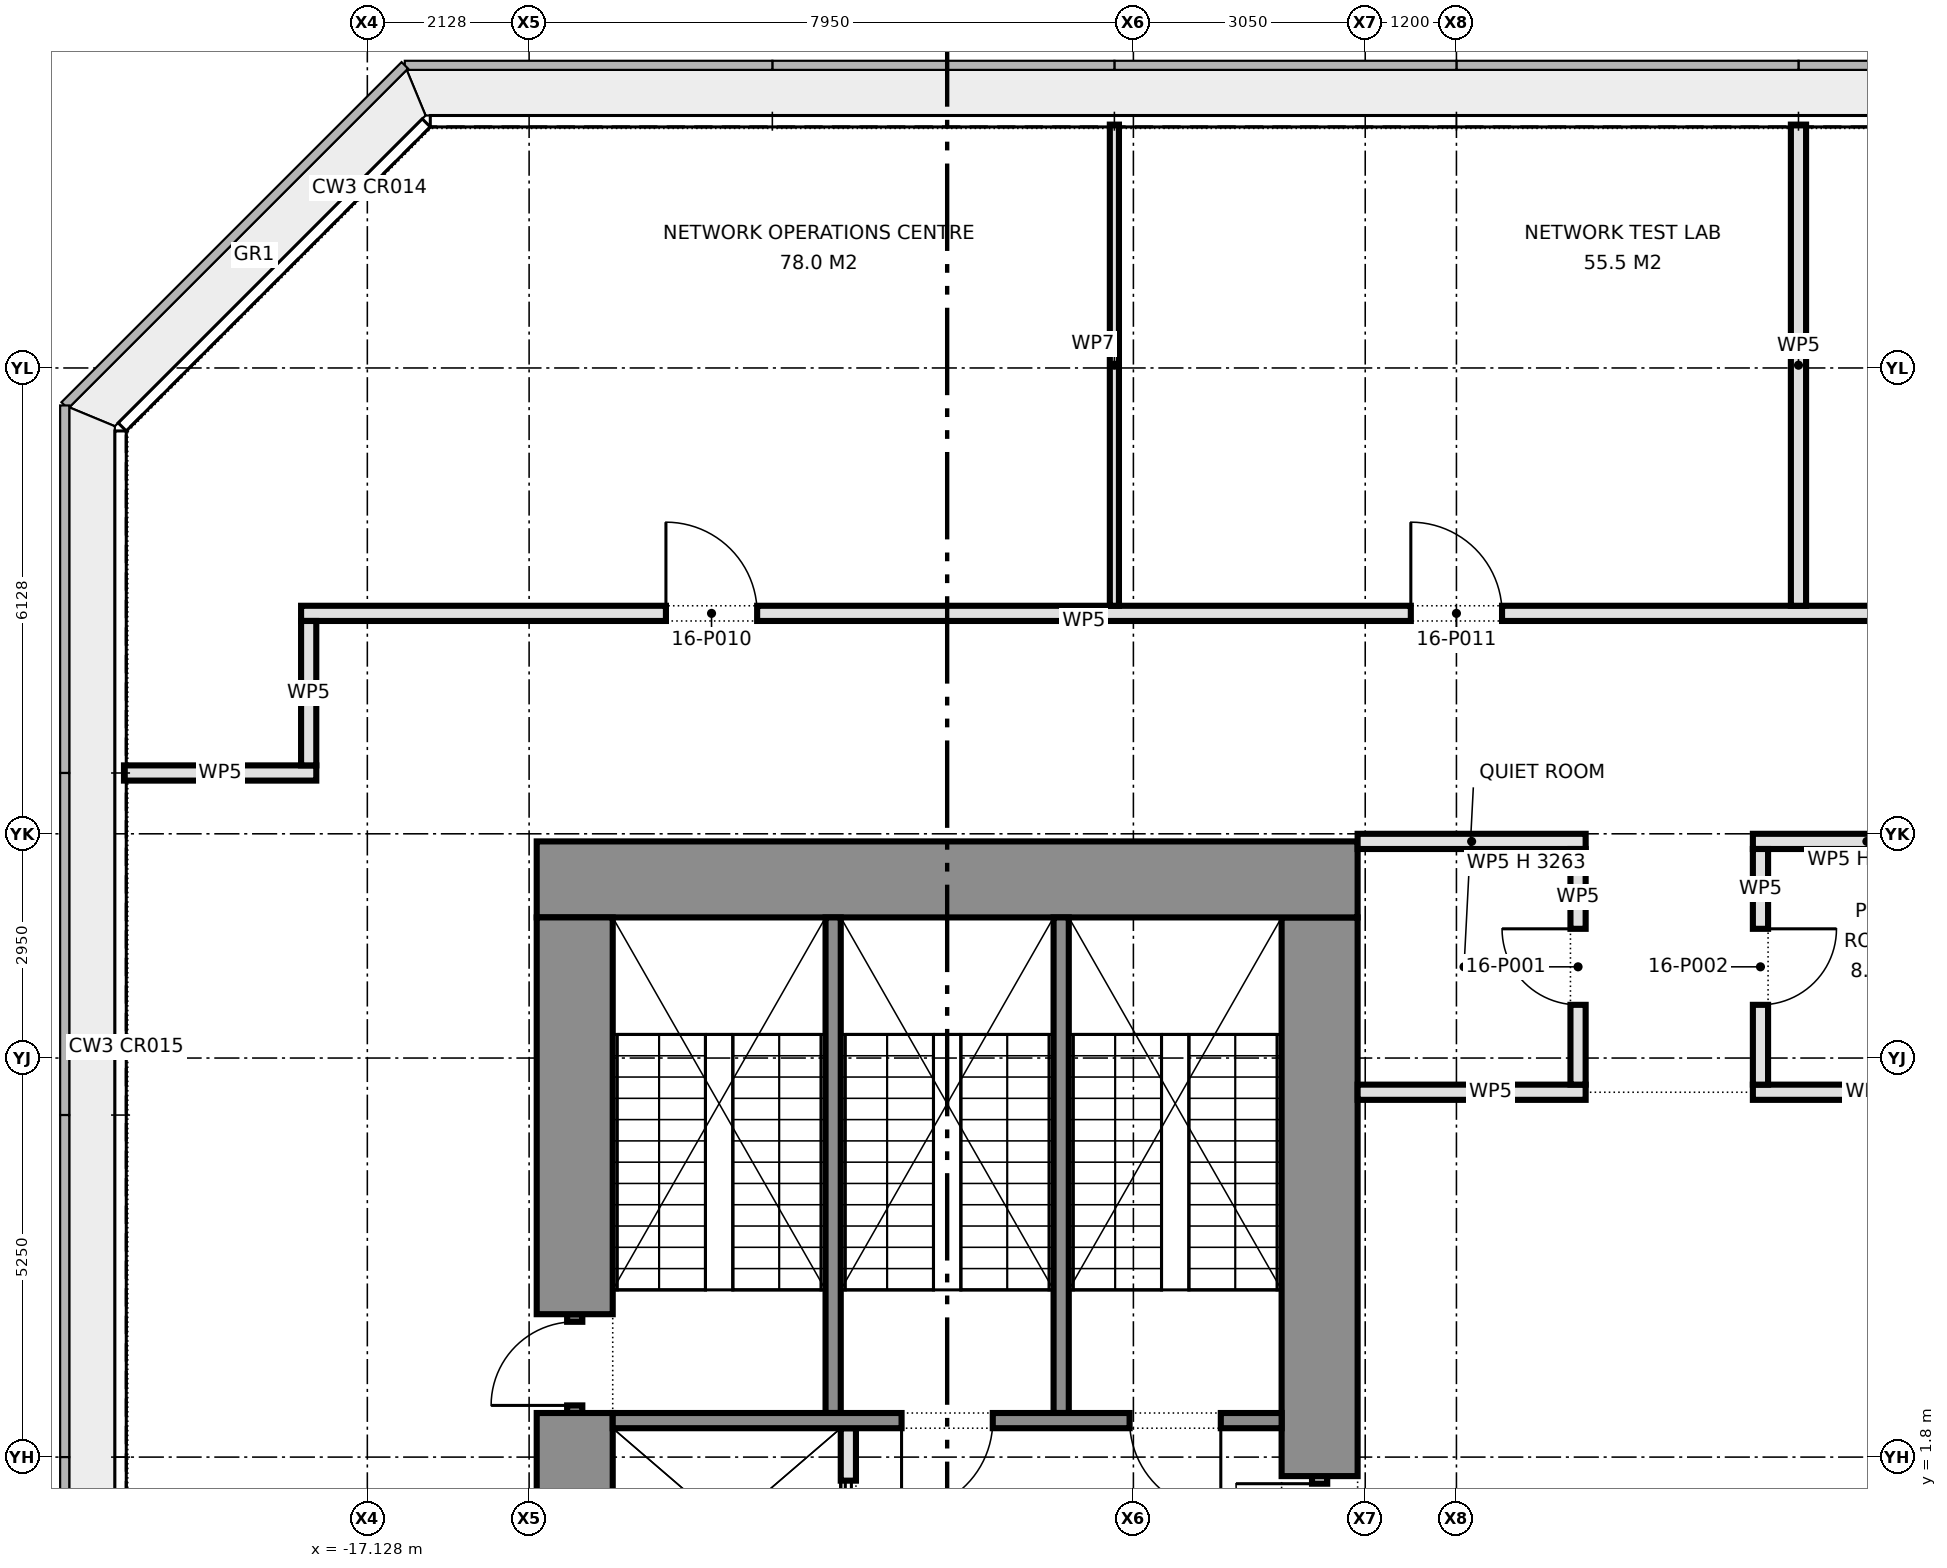
"""IFC4 building model, lengths in metres.
Left out: names, types, materials, properties, quantities, classifications, styles, units other than length and angle.
Written with IfcOpenShell. Run it as: python <this file> out.ifc"""

import sys

from ifc_helpers import new_model, si_unit, direction, frame, frame_2d, origin, place, context, subcontext, project, spatial, rectangle, extrude, element, fill, save


model = new_model("IFC4")
c1 = context("Model", 3, precision=1e-05, world=origin(), true_north=direction((0.0, 1.0)))
c2 = subcontext(c1, "Body", "Model", "MODEL_VIEW")
j1 = project(units=[si_unit("LENGTHUNIT", "METRE"), si_unit("PLANEANGLEUNIT", "RADIAN")], contexts=[c1])
p1 = place(None, origin())
s1 = spatial("IfcSite", under=j1, at=p1, CompositionType="ELEMENT")
p2 = place(p1, origin())
s2 = spatial("IfcBuilding", under=s1, at=p2, CompositionType="ELEMENT")
p3 = place(p2, frame((0.0, 0.0, 73.2)))
s3 = spatial("IfcBuildingStorey", under=s2, at=p3, CompositionType="ELEMENT", Elevation=73.2)
p4 = place(p3, frame((-14.9, 9.4, 0.0), z_axis=(0.0, 0.0, 1.0), x_axis=(1.0, 0.0, 0.0)))
e1 = element("IfcWall", 1, at=p4, inside=s3, PredefinedType="SHEAR", context=c2, shape_type="SweptSolid", body=[
    extrude(rectangle(XDim=10.8, YDim=1.0, at=frame_2d((5.4, 0.0))), origin(), (0.0, 0.0, 1.0), 4.2),
])
p5 = place(p3, frame((-14.4, -3.75, 0.0), z_axis=(0.0, 0.0, 1.0), x_axis=(0.0, 1.0, 0.0)))
e2 = element("IfcWall", 2, at=p5, inside=s3, PredefinedType="SHEAR", context=c2, shape_type="SweptSolid", body=[
    extrude(rectangle(XDim=6.13, YDim=1.0, at=frame_2d((3.065, 0.0))), origin(), (0.0, 0.0, 1.0), 4.2),
])
p6 = place(p3, frame((-14.4, 2.38, 0.0), z_axis=(0.0, 0.0, 1.0), x_axis=(0.0, 1.0, 0.0)))
e3 = element("IfcWall", 3, at=p6, inside=s3, PredefinedType="SHEAR", context=c2, shape_type="SweptSolid", body=[
    extrude(rectangle(XDim=1.3, YDim=0.2, at=frame_2d((0.65, 0.0))), origin(), (0.0, 0.0, 1.0), 2.4),
])
p7 = place(p6, frame((0.1, 0.0, 0.0)))
e4 = element("IfcOpeningElement", 4, at=p7, cuts=e3, PredefinedType="OPENING", context=c2, shape_type="SweptSolid", body=[
    extrude(rectangle(XDim=1.1, YDim=2.1, at=frame_2d((0.55, 1.05))), frame((0.0, 0.11, 0.0), z_axis=(0.0, -1.0, 0.0), x_axis=(1.0, 0.0, 0.0)), (0.0, 0.0, 1.0), 0.22),
])
p8 = place(p3, frame((-14.4, 3.68, 0.0), z_axis=(0.0, 0.0, 1.0), x_axis=(0.0, 1.0, 0.0)))
e5 = element("IfcWall", 5, at=p8, inside=s3, PredefinedType="SHEAR", context=c2, shape_type="SweptSolid", body=[
    extrude(rectangle(XDim=5.22, YDim=1.0, at=frame_2d((2.61, 0.0))), origin(), (0.0, 0.0, 1.0), 4.2),
])
p9 = place(p3, frame((-4.6, 0.25, 0.0), z_axis=(0.0, 0.0, 1.0), x_axis=(0.0, 1.0, 0.0)))
e6 = element("IfcWall", 6, at=p9, inside=s3, PredefinedType="PARTITIONING", context=c2, shape_type="SweptSolid", body=[
    extrude(rectangle(XDim=1.3, YDim=0.2, at=frame_2d((0.65, 0.0))), origin(), (0.0, 0.0, 1.0), 2.4),
])
p10 = place(p9, frame((0.1, 0.0, 0.0)))
e7 = element("IfcOpeningElement", 7, at=p10, cuts=e6, PredefinedType="OPENING", context=c2, shape_type="SweptSolid", body=[
    extrude(rectangle(XDim=1.1, YDim=2.1, at=frame_2d((0.55, 1.05))), frame((0.0, 0.11, 0.0), z_axis=(0.0, -1.0, 0.0), x_axis=(1.0, 0.0, 0.0)), (0.0, 0.0, 1.0), 0.22),
])
p11 = place(p3, frame((-4.6, 1.55, 0.0), z_axis=(0.0, 0.0, 1.0), x_axis=(0.0, 1.0, 0.0)))
e8 = element("IfcWall", 8, at=p11, inside=s3, PredefinedType="SHEAR", context=c2, shape_type="SweptSolid", body=[
    extrude(rectangle(XDim=7.35, YDim=1.0, at=frame_2d((3.675, 0.0))), origin(), (0.0, 0.0, 1.0), 4.2),
])
p12 = place(p3, frame((-10.8, -0.4, 0.0), z_axis=(0.0, 0.0, 1.0), x_axis=(0.0, 1.0, 0.0)))
e9 = element("IfcWall", 9, at=p12, inside=s3, PredefinedType="PARTITIONING", context=c2, shape_type="SweptSolid", body=[
    extrude(rectangle(XDim=2.58, YDim=0.2, at=frame_2d((1.29, 0.0))), origin(), (0.0, 0.0, 1.0), 4.2),
])
p13 = place(p12, frame((0.69, 0.0, 0.0)))
e10 = element("IfcOpeningElement", 10, at=p13, cuts=e9, PredefinedType="OPENING", context=c2, shape_type="SweptSolid", body=[
    extrude(rectangle(XDim=1.2, YDim=2.1, at=frame_2d((0.6, 1.05))), frame((0.0, 0.11, 0.0), z_axis=(0.0, -1.0, 0.0), x_axis=(1.0, 0.0, 0.0)), (0.0, 0.0, 1.0), 0.22),
])
p14 = place(p3, frame((-13.9, 2.28, 0.0), z_axis=(0.0, 0.0, 1.0), x_axis=(1.0, 0.0, 0.0)))
e11 = element("IfcWall", 11, at=p14, inside=s3, PredefinedType="SHEAR", context=c2, shape_type="SweptSolid", body=[
    extrude(rectangle(XDim=8.8, YDim=0.2, at=frame_2d((4.4, 0.0))), origin(), (0.0, 0.0, 1.0), 4.2),
])
p15 = place(p14, frame((3.8, 0.0, 0.0)))
e12 = element("IfcOpeningElement", 12, at=p15, cuts=e11, PredefinedType="OPENING", context=c2, shape_type="SweptSolid", body=[
    extrude(rectangle(XDim=1.2, YDim=2.1, at=frame_2d((0.6, 1.05))), frame((0.0, 0.11, 0.0), z_axis=(0.0, -1.0, 0.0), x_axis=(1.0, 0.0, 0.0)), (0.0, 0.0, 1.0), 0.22),
])
p16 = place(p14, frame((6.8, 0.0, 0.0)))
e13 = element("IfcOpeningElement", 13, at=p16, cuts=e11, PredefinedType="OPENING", context=c2, shape_type="SweptSolid", body=[
    extrude(rectangle(XDim=1.2, YDim=2.1, at=frame_2d((0.6, 1.05))), frame((0.0, 0.11, 0.0), z_axis=(0.0, -1.0, 0.0), x_axis=(1.0, 0.0, 0.0)), (0.0, 0.0, 1.0), 0.22),
])
for number, where, z_axis, x_axis in (
    (14, (-11.0, 2.38, 0.0), (0.0, 0.0, 1.0), (0.0, 1.0, 0.0)),
    (15, (-8.0, 2.38, 0.0), (0.0, 0.0, 1.0), (0.0, 1.0, 0.0)),
):
    element("IfcWall", number, at=place(p3, frame(where, z_axis=z_axis, x_axis=x_axis)), inside=s3, PredefinedType="SHEAR", context=c2, shape_type="SweptSolid", body=[
        extrude(rectangle(XDim=6.52, YDim=0.2, at=frame_2d((3.26, 0.0))), origin(), (0.0, 0.0, 1.0), 4.2),
    ])
for number, where, z_axis, x_axis in (
    (16, (-4.1, 6.6, 0.0), (0.0, 0.0, 1.0), (1.0, 0.0, 0.0)),
    (17, (1.1, 6.6, 0.0), (0.0, 0.0, 1.0), (1.0, 0.0, 0.0)),
):
    element("IfcWall", number, at=place(p3, frame(where, z_axis=z_axis, x_axis=x_axis)), inside=s3, PredefinedType="PARTITIONING", context=c2, shape_type="SweptSolid", body=[
        extrude(rectangle(XDim=3.0, YDim=0.2, at=frame_2d((1.5, 0.0))), origin(), (0.0, 0.0, 1.0), 4.2),
    ])
for number, where, z_axis, x_axis in (
    (18, (-4.1, 9.9, 0.0), (0.0, 0.0, 1.0), (1.0, 0.0, 0.0)),
    (19, (1.1, 9.9, 0.0), (0.0, 0.0, 1.0), (1.0, 0.0, 0.0)),
):
    element("IfcWall", number, at=place(p3, frame(where, z_axis=z_axis, x_axis=x_axis)), inside=s3, PredefinedType="PARTITIONING", context=c2, shape_type="SweptSolid", body=[
        extrude(rectangle(XDim=3.0, YDim=0.2, at=frame_2d((1.5, 0.0))), origin(), (0.0, 0.0, 1.0), 3.263),
    ])
p17 = place(p3, frame((-20.33, 10.8, 0.0), z_axis=(0.0, 0.0, 1.0), x_axis=(1.0, 0.0, 0.0)))
e20 = element("IfcWall", 20, at=p17, inside=s3, PredefinedType="PARTITIONING", context=c2, shape_type="SweptSolid", body=[
    extrude(rectangle(XDim=2.53, YDim=0.2, at=frame_2d((1.265, 0.0))), origin(), (0.0, 0.0, 1.0), 4.2),
])
p18 = place(p3, frame((-18.0, 12.9, 0.0), z_axis=(0.0, 0.0, 1.0), x_axis=(1.0, 0.0, 0.0)))
e21 = element("IfcWall", 21, at=p18, inside=s3, PredefinedType="PARTITIONING", context=c2, shape_type="SweptSolid", body=[
    extrude(rectangle(XDim=36.0, YDim=0.2, at=frame_2d((18.0, 0.0))), origin(), (0.0, 0.0, 1.0), 4.2),
])
p19 = place(p18, frame((4.8, 0.0, 0.0)))
e22 = element("IfcOpeningElement", 22, at=p19, cuts=e21, PredefinedType="OPENING", context=c2, shape_type="SweptSolid", body=[
    extrude(rectangle(XDim=1.2, YDim=2.1, at=frame_2d((0.6, 1.05))), frame((0.0, 0.11, 0.0), z_axis=(0.0, -1.0, 0.0), x_axis=(1.0, 0.0, 0.0)), (0.0, 0.0, 1.0), 0.22),
])
p20 = place(p18, frame((14.6, 0.0, 0.0)))
e23 = element("IfcOpeningElement", 23, at=p20, cuts=e21, PredefinedType="OPENING", context=c2, shape_type="SweptSolid", body=[
    extrude(rectangle(XDim=1.2, YDim=2.1, at=frame_2d((0.6, 1.05))), frame((0.0, 0.11, 0.0), z_axis=(0.0, -1.0, 0.0), x_axis=(1.0, 0.0, 0.0)), (0.0, 0.0, 1.0), 0.22),
])
p21 = place(p18, frame((23.3, 0.0, 0.0)))
e24 = element("IfcOpeningElement", 24, at=p21, cuts=e21, PredefinedType="OPENING", context=c2, shape_type="SweptSolid", body=[
    extrude(rectangle(XDim=1.8, YDim=2.1, at=frame_2d((0.9, 1.05))), frame((0.0, 0.11, 0.0), z_axis=(0.0, -1.0, 0.0), x_axis=(1.0, 0.0, 0.0)), (0.0, 0.0, 1.0), 0.22),
])
p22 = place(p18, frame((32.9, 0.0, 0.0)))
e25 = element("IfcOpeningElement", 25, at=p22, cuts=e21, PredefinedType="OPENING", context=c2, shape_type="SweptSolid", body=[
    extrude(rectangle(XDim=1.8, YDim=2.1, at=frame_2d((0.9, 1.05))), frame((0.0, 0.11, 0.0), z_axis=(0.0, -1.0, 0.0), x_axis=(1.0, 0.0, 0.0)), (0.0, 0.0, 1.0), 0.22),
])
p23 = place(p18, frame((29.7, 0.0, 0.0)))
e26 = element("IfcOpeningElement", 26, at=p23, cuts=e21, PredefinedType="OPENING", context=c2, shape_type="SweptSolid", body=[
    extrude(rectangle(XDim=1.0, YDim=2.1, at=frame_2d((0.5, 1.05))), frame((0.0, 0.11, 0.0), z_axis=(0.0, -1.0, 0.0), x_axis=(1.0, 0.0, 0.0)), (0.0, 0.0, 1.0), 0.22),
])
p24 = place(p3, frame((1.7, 13.0, 0.0), z_axis=(0.0, 0.0, 1.0), x_axis=(0.0, 1.0, 0.0)))
e27 = element("IfcWall", 27, at=p24, inside=s3, PredefinedType="PARTITIONING", context=c2, shape_type="SweptSolid", body=[
    extrude(rectangle(XDim=6.33, YDim=0.2, at=frame_2d((3.165, 0.0))), origin(), (0.0, 0.0, 1.0), 4.2),
])
p25 = place(p3, frame((1.2, 6.7, 0.0), z_axis=(0.0, 0.0, 1.0), x_axis=(0.0, 1.0, 0.0)))
e28 = element("IfcWall", 28, at=p25, inside=s3, PredefinedType="PARTITIONING", context=c2, shape_type="SweptSolid", body=[
    extrude(rectangle(XDim=3.1, YDim=0.2, at=frame_2d((1.55, 0.0))), origin(), (0.0, 0.0, 1.0), 4.2),
])
p26 = place(p25, frame((1.05, 0.0, 0.0)))
e29 = element("IfcOpeningElement", 29, at=p26, cuts=e28, PredefinedType="OPENING", context=c2, shape_type="SweptSolid", body=[
    extrude(rectangle(XDim=1.0, YDim=2.1, at=frame_2d((0.5, 1.05))), frame((0.0, 0.11, 0.0), z_axis=(0.0, -1.0, 0.0), x_axis=(1.0, 0.0, 0.0)), (0.0, 0.0, 1.0), 0.22),
])
p27 = place(p3, frame((-1.2, 6.7, 0.0), z_axis=(0.0, 0.0, 1.0), x_axis=(0.0, 1.0, 0.0)))
e30 = element("IfcWall", 30, at=p27, inside=s3, PredefinedType="PARTITIONING", context=c2, shape_type="SweptSolid", body=[
    extrude(rectangle(XDim=3.1, YDim=0.2, at=frame_2d((1.55, 0.0))), origin(), (0.0, 0.0, 1.0), 4.2),
])
p28 = place(p27, frame((1.05, 0.0, 0.0)))
e31 = element("IfcOpeningElement", 31, at=p28, cuts=e30, PredefinedType="OPENING", context=c2, shape_type="SweptSolid", body=[
    extrude(rectangle(XDim=1.0, YDim=2.1, at=frame_2d((0.5, 1.05))), frame((0.0, 0.11, 0.0), z_axis=(0.0, -1.0, 0.0), x_axis=(1.0, 0.0, 0.0)), (0.0, 0.0, 1.0), 0.22),
])
p29 = place(p3, frame((-17.9, 10.9, 0.0), z_axis=(0.0, 0.0, 1.0), x_axis=(0.0, 1.0, 0.0)))
e32 = element("IfcWall", 32, at=p29, inside=s3, PredefinedType="PARTITIONING", context=c2, shape_type="SweptSolid", body=[
    extrude(rectangle(XDim=1.9, YDim=0.2, at=frame_2d((0.95, 0.0))), origin(), (0.0, 0.0, 1.0), 4.2),
])
p30 = place(p3, frame((-7.3, 13.0, 0.0), z_axis=(0.0, 0.0, 1.0), x_axis=(0.0, 1.0, 0.0)))
e33 = element("IfcWall", 33, at=p30, inside=s3, PredefinedType="PARTITIONING", context=c2, shape_type="SweptSolid", body=[
    extrude(rectangle(XDim=6.33, YDim=0.12, at=frame_2d((3.165, 0.0))), origin(), (0.0, 0.0, 1.0), 4.2),
])
p31 = place(p7, origin())
e34 = element("IfcDoor", 34, at=p31, inside=s3, OperationType="SINGLE_SWING_LEFT", PredefinedType="DOOR", context=c2, shape_type="SweptSolid", body=[
    extrude(rectangle(XDim=1.1, YDim=2.1, at=frame_2d((0.55, 1.05))), frame((0.0, 0.025, 0.0), z_axis=(0.0, -1.0, 0.0), x_axis=(1.0, 0.0, 0.0)), (0.0, 0.0, 1.0), 0.05),
])
fill(e4, e34)
p32 = place(p10, origin())
e35 = element("IfcDoor", 35, at=p32, inside=s3, OperationType="SINGLE_SWING_RIGHT", PredefinedType="DOOR", context=c2, shape_type="SweptSolid", body=[
    extrude(rectangle(XDim=1.1, YDim=2.1, at=frame_2d((0.55, 1.05))), frame((0.0, 0.025, 0.0), z_axis=(0.0, -1.0, 0.0), x_axis=(1.0, 0.0, 0.0)), (0.0, 0.0, 1.0), 0.05),
])
fill(e7, e35)
p33 = place(p13, origin())
e36 = element("IfcDoor", 36, at=p33, inside=s3, OperationType="DOUBLE_DOOR_SLIDING", PredefinedType="DOOR", context=c2, shape_type="SweptSolid", body=[
    extrude(rectangle(XDim=1.2, YDim=2.1, at=frame_2d((0.6, 1.05))), frame((0.0, 0.025, 0.0), z_axis=(0.0, -1.0, 0.0), x_axis=(1.0, 0.0, 0.0)), (0.0, 0.0, 1.0), 0.05),
])
fill(e10, e36)
p34 = place(p15, frame((1.2, 0.0, 0.0), z_axis=(0.0, 0.0, 1.0), x_axis=(-1.0, 0.0, 0.0)))
e37 = element("IfcDoor", 37, at=p34, inside=s3, OperationType="SINGLE_SWING_RIGHT", PredefinedType="DOOR", context=c2, shape_type="SweptSolid", body=[
    extrude(rectangle(XDim=1.2, YDim=2.1, at=frame_2d((0.6, 1.05))), frame((0.0, 0.025, 0.0), z_axis=(0.0, -1.0, 0.0), x_axis=(1.0, 0.0, 0.0)), (0.0, 0.0, 1.0), 0.05),
])
fill(e12, e37)
p35 = place(p16, frame((1.2, 0.0, 0.0), z_axis=(0.0, 0.0, 1.0), x_axis=(-1.0, 0.0, 0.0)))
e38 = element("IfcDoor", 38, at=p35, inside=s3, OperationType="SINGLE_SWING_LEFT", PredefinedType="DOOR", context=c2, shape_type="SweptSolid", body=[
    extrude(rectangle(XDim=1.2, YDim=2.1, at=frame_2d((0.6, 1.05))), frame((0.0, 0.025, 0.0), z_axis=(0.0, -1.0, 0.0), x_axis=(1.0, 0.0, 0.0)), (0.0, 0.0, 1.0), 0.05),
])
fill(e13, e38)
p36 = place(p28, origin())
e39 = element("IfcDoor", 39, at=p36, inside=s3, OperationType="SINGLE_SWING_RIGHT", PredefinedType="DOOR", context=c2, shape_type="SweptSolid", body=[
    extrude(rectangle(XDim=1.0, YDim=2.1, at=frame_2d((0.5, 1.05))), frame((0.0, 0.025, 0.0), z_axis=(0.0, -1.0, 0.0), x_axis=(1.0, 0.0, 0.0)), (0.0, 0.0, 1.0), 0.05),
])
fill(e31, e39)
p37 = place(p26, frame((1.0, 0.0, 0.0), z_axis=(0.0, 0.0, 1.0), x_axis=(-1.0, 0.0, 0.0)))
e40 = element("IfcDoor", 40, at=p37, inside=s3, OperationType="SINGLE_SWING_LEFT", PredefinedType="DOOR", context=c2, shape_type="SweptSolid", body=[
    extrude(rectangle(XDim=1.0, YDim=2.1, at=frame_2d((0.5, 1.05))), frame((0.0, 0.025, 0.0), z_axis=(0.0, -1.0, 0.0), x_axis=(1.0, 0.0, 0.0)), (0.0, 0.0, 1.0), 0.05),
])
fill(e29, e40)
p38 = place(p19, origin())
e41 = element("IfcDoor", 41, at=p38, inside=s3, OperationType="SINGLE_SWING_LEFT", PredefinedType="DOOR", context=c2, shape_type="SweptSolid", body=[
    extrude(rectangle(XDim=1.2, YDim=2.1, at=frame_2d((0.6, 1.05))), frame((0.0, 0.025, 0.0), z_axis=(0.0, -1.0, 0.0), x_axis=(1.0, 0.0, 0.0)), (0.0, 0.0, 1.0), 0.05),
])
fill(e22, e41)
p39 = place(p20, origin())
e42 = element("IfcDoor", 42, at=p39, inside=s3, OperationType="SINGLE_SWING_LEFT", PredefinedType="DOOR", context=c2, shape_type="SweptSolid", body=[
    extrude(rectangle(XDim=1.2, YDim=2.1, at=frame_2d((0.6, 1.05))), frame((0.0, 0.025, 0.0), z_axis=(0.0, -1.0, 0.0), x_axis=(1.0, 0.0, 0.0)), (0.0, 0.0, 1.0), 0.05),
])
fill(e23, e42)
save(model, sys.argv[1])
